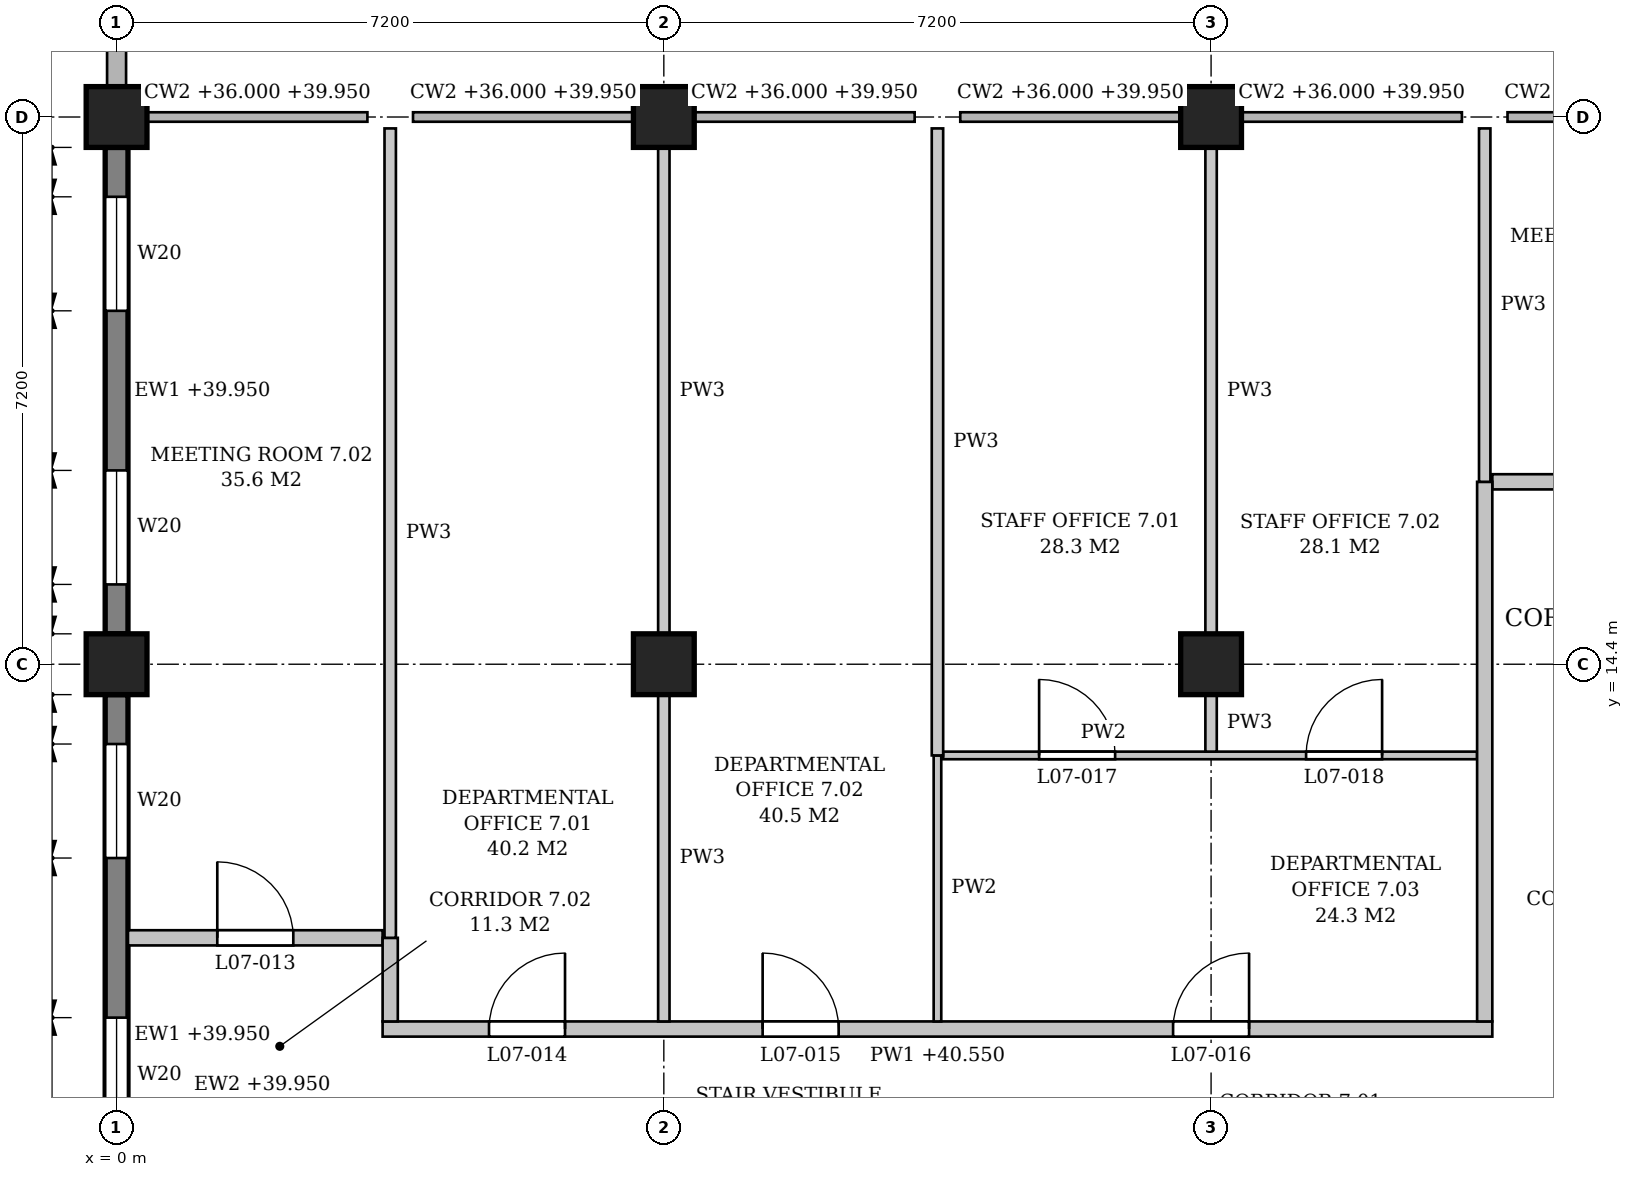
"""IFC4 building model, lengths in metres.
Left out: names, types, materials, properties, quantities, classifications, styles, units other than length and angle.
Written with IfcOpenShell. Run it as: python <this file> out.ifc"""

import sys

from ifc_helpers import new_model, si_unit, direction, frame, frame_2d, origin, origin_2d, place, context, subcontext, project, spatial, polyline, rectangle, outline, extrude, element, fill, save


model = new_model("IFC4")
c1 = context("Model", 3, precision=1e-05, world=origin(), true_north=direction((0.0, 1.0)))
c2 = subcontext(c1, "Body", "Model", "MODEL_VIEW")
j1 = project(units=[si_unit("LENGTHUNIT", "METRE"), si_unit("PLANEANGLEUNIT", "RADIAN")], contexts=[c1])
p1 = place(None, origin())
s1 = spatial("IfcSite", under=j1, at=p1, CompositionType="ELEMENT")
p2 = place(p1, origin())
s2 = spatial("IfcBuilding", under=s1, at=p2, CompositionType="ELEMENT")
p3 = place(p2, frame((0.0, 0.0, 36.0)))
s3 = spatial("IfcBuildingStorey", under=s2, at=p3, CompositionType="ELEMENT", Elevation=36.0)
for number, where, z_axis, x_axis in (
    (1, (0.0, 14.4, 0.0), (0.0, 0.0, 1.0), (1.0, 0.0, 0.0)),
    (2, (0.0, 21.6, 0.0), (0.0, 0.0, 1.0), (1.0, 0.0, 0.0)),
    (3, (7.2, 14.4, 0.0), (0.0, 0.0, 1.0), (1.0, 0.0, 0.0)),
    (4, (7.2, 21.6, 0.0), (0.0, 0.0, 1.0), (1.0, 0.0, 0.0)),
    (5, (14.4, 14.4, 0.0), (0.0, 0.0, 1.0), (1.0, 0.0, 0.0)),
    (6, (14.4, 21.6, 0.0), (0.0, 0.0, 1.0), (1.0, 0.0, 0.0)),
):
    element("IfcColumn", number, at=place(p3, frame(where, z_axis=z_axis, x_axis=x_axis)), inside=s3, PredefinedType="COLUMN", context=c2, shape_type="SweptSolid", body=[
        extrude(rectangle(XDim=0.8, YDim=0.8, at=origin_2d()), origin(), (0.0, 0.0, 1.0), 4.8),
    ])
p4 = place(p3, frame((0.0, 7.6, 0.0), z_axis=(0.0, 0.0, 1.0), x_axis=(0.0, 1.0, 0.0)))
e7 = element("IfcWall", 7, at=p4, inside=s3, PredefinedType="STANDARD", context=c2, shape_type="SweptSolid", body=[
    extrude(rectangle(XDim=6.4, YDim=0.3, at=frame_2d((3.2, 0.0))), origin(), (0.0, 0.0, 1.0), 3.95),
])
p5 = place(p4, frame((0.65, 0.0, 0.9)))
e8 = element("IfcOpeningElement", 8, at=p5, cuts=e7, PredefinedType="OPENING", context=c2, shape_type="SweptSolid", body=[
    extrude(outline(polyline([(0.0, 0.0), (1.5, 0.0), (1.5, 2.25), (0.75, 3.0), (0.0, 2.25), (0.0, 0.0)])), frame((0.0, 0.16, 0.0), z_axis=(0.0, -1.0, 0.0), x_axis=(1.0, 0.0, 0.0)), (0.0, 0.0, 1.0), 0.32),
])
p6 = place(p4, frame((4.25, 0.0, 0.9)))
e9 = element("IfcOpeningElement", 9, at=p6, cuts=e7, PredefinedType="OPENING", context=c2, shape_type="SweptSolid", body=[
    extrude(outline(polyline([(0.0, 0.0), (1.5, 0.0), (1.5, 2.25), (0.75, 3.0), (0.0, 2.25), (0.0, 0.0)])), frame((0.0, 0.16, 0.0), z_axis=(0.0, -1.0, 0.0), x_axis=(1.0, 0.0, 0.0)), (0.0, 0.0, 1.0), 0.32),
])
p7 = place(p3, frame((0.0, 14.8, 0.0), z_axis=(0.0, 0.0, 1.0), x_axis=(0.0, 1.0, 0.0)))
e10 = element("IfcWall", 10, at=p7, inside=s3, PredefinedType="STANDARD", context=c2, shape_type="SweptSolid", body=[
    extrude(rectangle(XDim=6.4, YDim=0.3, at=frame_2d((3.2, 0.0))), origin(), (0.0, 0.0, 1.0), 3.95),
])
p8 = place(p7, frame((0.65, 0.0, 0.9)))
e11 = element("IfcOpeningElement", 11, at=p8, cuts=e10, PredefinedType="OPENING", context=c2, shape_type="SweptSolid", body=[
    extrude(outline(polyline([(0.0, 0.0), (1.5, 0.0), (1.5, 2.25), (0.75, 3.0), (0.0, 2.25), (0.0, 0.0)])), frame((0.0, 0.16, 0.0), z_axis=(0.0, -1.0, 0.0), x_axis=(1.0, 0.0, 0.0)), (0.0, 0.0, 1.0), 0.32),
])
p9 = place(p7, frame((4.25, 0.0, 0.9)))
e12 = element("IfcOpeningElement", 12, at=p9, cuts=e10, PredefinedType="OPENING", context=c2, shape_type="SweptSolid", body=[
    extrude(outline(polyline([(0.0, 0.0), (1.5, 0.0), (1.5, 2.25), (0.75, 3.0), (0.0, 2.25), (0.0, 0.0)])), frame((0.0, 0.16, 0.0), z_axis=(0.0, -1.0, 0.0), x_axis=(1.0, 0.0, 0.0)), (0.0, 0.0, 1.0), 0.32),
])
p10 = place(p3, frame((0.0, 22.0, 4.8), z_axis=(0.0, 0.0, 1.0), x_axis=(0.0, 1.0, 0.0)))
e13 = element("IfcWall", 13, at=p10, inside=s3, PredefinedType="POLYGONAL", context=c2, shape_type="SweptSolid", body=[
    extrude(outline(polyline([(0.0, 0.0), (13.6, 0.0), (13.6, 0.4), (6.8, 7.2), (0.0, 0.4), (0.0, 0.0)])), frame((0.0, 0.15, 0.0), z_axis=(0.0, -1.0, 0.0), x_axis=(1.0, 0.0, 0.0)), (0.0, 0.0, 1.0), 0.3),
])
p11 = place(p10, frame((6.05, 0.0, 3.5)))
e14 = element("IfcOpeningElement", 14, at=p11, cuts=e13, PredefinedType="OPENING", context=c2, shape_type="SweptSolid", body=[
    extrude(outline(polyline([(0.0, 0.0), (1.5, 0.0), (1.5, 1.95), (0.75, 2.7), (0.0, 1.95), (0.0, 0.0)])), frame((0.0, 0.16, 0.0), z_axis=(0.0, -1.0, 0.0), x_axis=(1.0, 0.0, 0.0)), (0.0, 0.0, 1.0), 0.32),
])
p12 = place(p10, frame((2.6, 0.0, 0.8)))
e15 = element("IfcOpeningElement", 15, at=p12, cuts=e13, PredefinedType="OPENING", context=c2, shape_type="SweptSolid", body=[
    extrude(outline(polyline([(0.0, 0.0), (1.2, 0.0), (1.2, 1.65), (0.6, 2.25), (0.0, 1.65), (0.0, 0.0)])), frame((0.0, 0.16, 0.0), z_axis=(0.0, -1.0, 0.0), x_axis=(1.0, 0.0, 0.0)), (0.0, 0.0, 1.0), 0.32),
])
p13 = place(p10, frame((9.8, 0.0, 0.8)))
e16 = element("IfcOpeningElement", 16, at=p13, cuts=e13, PredefinedType="OPENING", context=c2, shape_type="SweptSolid", body=[
    extrude(outline(polyline([(0.0, 0.0), (1.2, 0.0), (1.2, 1.65), (0.6, 2.25), (0.0, 1.65), (0.0, 0.0)])), frame((0.0, 0.16, 0.0), z_axis=(0.0, -1.0, 0.0), x_axis=(1.0, 0.0, 0.0)), (0.0, 0.0, 1.0), 0.32),
])
p14 = place(p3, frame((3.5, 9.6, 0.0), z_axis=(0.0, 0.0, 1.0), x_axis=(1.0, 0.0, 0.0)))
e17 = element("IfcWall", 17, at=p14, inside=s3, PredefinedType="PARTITIONING", context=c2, shape_type="SweptSolid", body=[
    extrude(outline(polyline([(0.0, 0.0), (14.6, 0.0), (14.6, 4.55), (11.125, 4.55), (11.125, 3.85), (10.675, 3.85), (10.675, 4.55), (3.925, 4.55), (3.925, 3.85), (3.475, 3.85), (3.475, 4.55), (0.0, 4.55), (0.0, 0.0)])), frame((0.0, 0.1, 0.0), z_axis=(0.0, -1.0, 0.0), x_axis=(1.0, 0.0, 0.0)), (0.0, 0.0, 1.0), 0.2),
])
p15 = place(p14, frame((1.4, 0.0, 0.0)))
e18 = element("IfcOpeningElement", 18, at=p15, cuts=e17, PredefinedType="OPENING", context=c2, shape_type="SweptSolid", body=[
    extrude(rectangle(XDim=1.0, YDim=2.1, at=frame_2d((0.5, 1.05))), frame((0.0, 0.11, 0.0), z_axis=(0.0, -1.0, 0.0), x_axis=(1.0, 0.0, 0.0)), (0.0, 0.0, 1.0), 0.22),
])
p16 = place(p14, frame((5.0, 0.0, 0.0)))
e19 = element("IfcOpeningElement", 19, at=p16, cuts=e17, PredefinedType="OPENING", context=c2, shape_type="SweptSolid", body=[
    extrude(rectangle(XDim=1.0, YDim=2.1, at=frame_2d((0.5, 1.05))), frame((0.0, 0.11, 0.0), z_axis=(0.0, -1.0, 0.0), x_axis=(1.0, 0.0, 0.0)), (0.0, 0.0, 1.0), 0.22),
])
p17 = place(p14, frame((10.4, 0.0, 0.0)))
e20 = element("IfcOpeningElement", 20, at=p17, cuts=e17, PredefinedType="OPENING", context=c2, shape_type="SweptSolid", body=[
    extrude(rectangle(XDim=1.0, YDim=2.1, at=frame_2d((0.5, 1.05))), frame((0.0, 0.11, 0.0), z_axis=(0.0, -1.0, 0.0), x_axis=(1.0, 0.0, 0.0)), (0.0, 0.0, 1.0), 0.22),
])
p18 = place(p3, frame((0.15, 10.8, 0.0), z_axis=(0.0, 0.0, 1.0), x_axis=(1.0, 0.0, 0.0)))
e21 = element("IfcWall", 21, at=p18, inside=s3, PredefinedType="PARTITIONING", context=c2, shape_type="SweptSolid", body=[
    extrude(outline(polyline([(0.0, 0.0), (3.35, 0.0), (3.35, 4.55), (0.05, 4.55), (0.05, 3.95), (0.0, 3.95), (0.0, 0.0)])), frame((0.0, 0.1, 0.0), z_axis=(0.0, -1.0, 0.0), x_axis=(1.0, 0.0, 0.0)), (0.0, 0.0, 1.0), 0.2),
])
p19 = place(p18, frame((1.175, 0.0, 0.0)))
e22 = element("IfcOpeningElement", 22, at=p19, cuts=e21, PredefinedType="OPENING", context=c2, shape_type="SweptSolid", body=[
    extrude(rectangle(XDim=1.0, YDim=2.1, at=frame_2d((0.5, 1.05))), frame((0.0, 0.11, 0.0), z_axis=(0.0, -1.0, 0.0), x_axis=(1.0, 0.0, 0.0)), (0.0, 0.0, 1.0), 0.22),
])
p20 = place(p3, frame((10.875, 13.2, 0.0), z_axis=(0.0, 0.0, 1.0), x_axis=(1.0, 0.0, 0.0)))
e23 = element("IfcWall", 23, at=p20, inside=s3, PredefinedType="PARTITIONING", context=c2, shape_type="SweptSolid", body=[
    extrude(rectangle(XDim=7.025, YDim=0.1, at=frame_2d((3.512, 0.0))), origin(), (0.0, 0.0, 1.0), 3.85),
])
p21 = place(p20, frame((1.262, 0.0, 0.0)))
e24 = element("IfcOpeningElement", 24, at=p21, cuts=e23, PredefinedType="OPENING", context=c2, shape_type="SweptSolid", body=[
    extrude(rectangle(XDim=1.0, YDim=2.1, at=frame_2d((0.5, 1.05))), frame((0.0, 0.06, 0.0), z_axis=(0.0, -1.0, 0.0), x_axis=(1.0, 0.0, 0.0)), (0.0, 0.0, 1.0), 0.12),
])
p22 = place(p20, frame((4.775, 0.0, 0.0)))
e25 = element("IfcOpeningElement", 25, at=p22, cuts=e23, PredefinedType="OPENING", context=c2, shape_type="SweptSolid", body=[
    extrude(rectangle(XDim=1.0, YDim=2.1, at=frame_2d((0.5, 1.05))), frame((0.0, 0.06, 0.0), z_axis=(0.0, -1.0, 0.0), x_axis=(1.0, 0.0, 0.0)), (0.0, 0.0, 1.0), 0.12),
])
p23 = place(p3, frame((18.1, 16.8, 0.0), z_axis=(0.0, 0.0, 1.0), x_axis=(1.0, 0.0, 0.0)))
e26 = element("IfcWall", 26, at=p23, inside=s3, PredefinedType="PARTITIONING", context=c2, shape_type="SweptSolid", body=[
    extrude(outline(polyline([(0.0, 0.0), (3.4, 0.0), (3.4, 3.85), (3.275, 3.85), (3.275, 4.55), (0.0, 4.55), (0.0, 0.0)])), frame((0.0, 0.1, 0.0), z_axis=(0.0, -1.0, 0.0), x_axis=(1.0, 0.0, 0.0)), (0.0, 0.0, 1.0), 0.2),
])
p24 = place(p23, frame((1.2, 0.0, 0.0)))
e27 = element("IfcOpeningElement", 27, at=p24, cuts=e26, PredefinedType="OPENING", context=c2, shape_type="SweptSolid", body=[
    extrude(rectangle(XDim=1.0, YDim=2.1, at=frame_2d((0.5, 1.05))), frame((0.0, 0.11, 0.0), z_axis=(0.0, -1.0, 0.0), x_axis=(1.0, 0.0, 0.0)), (0.0, 0.0, 1.0), 0.22),
])
p25 = place(p3, frame((3.6, 9.7, 0.0), z_axis=(0.0, 0.0, 1.0), x_axis=(0.0, 1.0, 0.0)))
e28 = element("IfcWall", 28, at=p25, inside=s3, PredefinedType="PARTITIONING", context=c2, shape_type="SweptSolid", body=[
    extrude(rectangle(XDim=1.1, YDim=0.2, at=frame_2d((0.55, 0.0))), origin(), (0.0, 0.0, 1.0), 4.55),
])
p26 = place(p3, frame((3.6, 10.8, 0.0), z_axis=(0.0, 0.0, 1.0), x_axis=(0.0, 1.0, 0.0)))
e29 = element("IfcWall", 29, at=p26, inside=s3, PredefinedType="PARTITIONING", context=c2, shape_type="SweptSolid", body=[
    extrude(rectangle(XDim=10.65, YDim=0.15, at=frame_2d((5.325, 0.0))), origin(), (0.0, 0.0, 1.0), 3.85),
])
p27 = place(p3, frame((7.2, 9.7, 0.0), z_axis=(0.0, 0.0, 1.0), x_axis=(0.0, 1.0, 0.0)))
e30 = element("IfcWall", 30, at=p27, inside=s3, PredefinedType="PARTITIONING", context=c2, shape_type="SweptSolid", body=[
    extrude(rectangle(XDim=4.3, YDim=0.15, at=frame_2d((2.15, 0.0))), origin(), (0.0, 0.0, 1.0), 3.85),
])
p28 = place(p3, frame((7.2, 14.8, 0.0), z_axis=(0.0, 0.0, 1.0), x_axis=(0.0, 1.0, 0.0)))
e31 = element("IfcWall", 31, at=p28, inside=s3, PredefinedType="PARTITIONING", context=c2, shape_type="SweptSolid", body=[
    extrude(rectangle(XDim=6.4, YDim=0.15, at=frame_2d((3.2, 0.0))), origin(), (0.0, 0.0, 1.0), 3.85),
])
p29 = place(p3, frame((10.8, 9.7, 0.0), z_axis=(0.0, 0.0, 1.0), x_axis=(0.0, 1.0, 0.0)))
e32 = element("IfcWall", 32, at=p29, inside=s3, PredefinedType="PARTITIONING", context=c2, shape_type="SweptSolid", body=[
    extrude(rectangle(XDim=3.5, YDim=0.1, at=frame_2d((1.75, 0.0))), origin(), (0.0, 0.0, 1.0), 3.85),
])
p30 = place(p3, frame((10.8, 13.2, 0.0), z_axis=(0.0, 0.0, 1.0), x_axis=(0.0, 1.0, 0.0)))
e33 = element("IfcWall", 33, at=p30, inside=s3, PredefinedType="PARTITIONING", context=c2, shape_type="SweptSolid", body=[
    extrude(rectangle(XDim=8.25, YDim=0.15, at=frame_2d((4.125, 0.0))), origin(), (0.0, 0.0, 1.0), 3.85),
])
p31 = place(p3, frame((14.4, 13.25, 0.0), z_axis=(0.0, 0.0, 1.0), x_axis=(0.0, 1.0, 0.0)))
e34 = element("IfcWall", 34, at=p31, inside=s3, PredefinedType="PARTITIONING", context=c2, shape_type="SweptSolid", body=[
    extrude(rectangle(XDim=0.75, YDim=0.15, at=frame_2d((0.375, 0.0))), origin(), (0.0, 0.0, 1.0), 3.85),
])
p32 = place(p3, frame((14.4, 14.8, 0.0), z_axis=(0.0, 0.0, 1.0), x_axis=(0.0, 1.0, 0.0)))
e35 = element("IfcWall", 35, at=p32, inside=s3, PredefinedType="PARTITIONING", context=c2, shape_type="SweptSolid", body=[
    extrude(rectangle(XDim=6.4, YDim=0.15, at=frame_2d((3.2, 0.0))), origin(), (0.0, 0.0, 1.0), 3.85),
])
p33 = place(p3, frame((18.0, 9.7, 0.0), z_axis=(0.0, 0.0, 1.0), x_axis=(0.0, 1.0, 0.0)))
e36 = element("IfcWall", 36, at=p33, inside=s3, PredefinedType="PARTITIONING", context=c2, shape_type="SweptSolid", body=[
    extrude(outline(polyline([(0.0, 0.0), (7.1, 0.0), (7.1, 4.55), (4.925, 4.55), (4.925, 3.85), (4.475, 3.85), (4.475, 4.55), (0.0, 4.55), (0.0, 0.0)])), frame((0.0, 0.1, 0.0), z_axis=(0.0, -1.0, 0.0), x_axis=(1.0, 0.0, 0.0)), (0.0, 0.0, 1.0), 0.2),
])
p34 = place(p3, frame((18.0, 16.8, 0.0), z_axis=(0.0, 0.0, 1.0), x_axis=(0.0, 1.0, 0.0)))
e37 = element("IfcWall", 37, at=p34, inside=s3, PredefinedType="PARTITIONING", context=c2, shape_type="SweptSolid", body=[
    extrude(rectangle(XDim=4.65, YDim=0.15, at=frame_2d((2.325, 0.0))), origin(), (0.0, 0.0, 1.0), 3.85),
])
p35 = place(p5, origin())
e38 = element("IfcWindow", 38, at=p35, inside=s3, PartitioningType="SINGLE_PANEL", PredefinedType="WINDOW", context=c2, shape_type="SweptSolid", body=[
    extrude(outline(polyline([(0.0, 0.0), (1.5, 0.0), (1.5, 2.25), (0.75, 3.0), (0.0, 2.25), (0.0, 0.0)])), frame((0.0, 0.03, 0.0), z_axis=(0.0, -1.0, 0.0), x_axis=(1.0, 0.0, 0.0)), (0.0, 0.0, 1.0), 0.06),
])
fill(e8, e38)
p36 = place(p6, origin())
e39 = element("IfcWindow", 39, at=p36, inside=s3, PartitioningType="SINGLE_PANEL", PredefinedType="WINDOW", context=c2, shape_type="SweptSolid", body=[
    extrude(outline(polyline([(0.0, 0.0), (1.5, 0.0), (1.5, 2.25), (0.75, 3.0), (0.0, 2.25), (0.0, 0.0)])), frame((0.0, 0.03, 0.0), z_axis=(0.0, -1.0, 0.0), x_axis=(1.0, 0.0, 0.0)), (0.0, 0.0, 1.0), 0.06),
])
fill(e9, e39)
p37 = place(p8, origin())
e40 = element("IfcWindow", 40, at=p37, inside=s3, PartitioningType="SINGLE_PANEL", PredefinedType="WINDOW", context=c2, shape_type="SweptSolid", body=[
    extrude(outline(polyline([(0.0, 0.0), (1.5, 0.0), (1.5, 2.25), (0.75, 3.0), (0.0, 2.25), (0.0, 0.0)])), frame((0.0, 0.03, 0.0), z_axis=(0.0, -1.0, 0.0), x_axis=(1.0, 0.0, 0.0)), (0.0, 0.0, 1.0), 0.06),
])
fill(e11, e40)
p38 = place(p9, origin())
e41 = element("IfcWindow", 41, at=p38, inside=s3, PartitioningType="SINGLE_PANEL", PredefinedType="WINDOW", context=c2, shape_type="SweptSolid", body=[
    extrude(outline(polyline([(0.0, 0.0), (1.5, 0.0), (1.5, 2.25), (0.75, 3.0), (0.0, 2.25), (0.0, 0.0)])), frame((0.0, 0.03, 0.0), z_axis=(0.0, -1.0, 0.0), x_axis=(1.0, 0.0, 0.0)), (0.0, 0.0, 1.0), 0.06),
])
fill(e12, e41)
p39 = place(p19, origin())
e42 = element("IfcDoor", 42, at=p39, inside=s3, OperationType="SINGLE_SWING_LEFT", PredefinedType="DOOR", context=c2, shape_type="SweptSolid", body=[
    extrude(rectangle(XDim=1.0, YDim=2.1, at=frame_2d((0.5, 1.05))), frame((0.0, 0.025, 0.0), z_axis=(0.0, -1.0, 0.0), x_axis=(1.0, 0.0, 0.0)), (0.0, 0.0, 1.0), 0.05),
])
fill(e22, e42)
p40 = place(p15, origin())
e43 = element("IfcDoor", 43, at=p40, inside=s3, OperationType="SINGLE_SWING_RIGHT", PredefinedType="DOOR", context=c2, shape_type="SweptSolid", body=[
    extrude(rectangle(XDim=1.0, YDim=2.1, at=frame_2d((0.5, 1.05))), frame((0.0, 0.025, 0.0), z_axis=(0.0, -1.0, 0.0), x_axis=(1.0, 0.0, 0.0)), (0.0, 0.0, 1.0), 0.05),
])
fill(e18, e43)
p41 = place(p16, origin())
e44 = element("IfcDoor", 44, at=p41, inside=s3, OperationType="SINGLE_SWING_LEFT", PredefinedType="DOOR", context=c2, shape_type="SweptSolid", body=[
    extrude(rectangle(XDim=1.0, YDim=2.1, at=frame_2d((0.5, 1.05))), frame((0.0, 0.025, 0.0), z_axis=(0.0, -1.0, 0.0), x_axis=(1.0, 0.0, 0.0)), (0.0, 0.0, 1.0), 0.05),
])
fill(e19, e44)
p42 = place(p17, origin())
e45 = element("IfcDoor", 45, at=p42, inside=s3, OperationType="SINGLE_SWING_RIGHT", PredefinedType="DOOR", context=c2, shape_type="SweptSolid", body=[
    extrude(rectangle(XDim=1.0, YDim=2.1, at=frame_2d((0.5, 1.05))), frame((0.0, 0.025, 0.0), z_axis=(0.0, -1.0, 0.0), x_axis=(1.0, 0.0, 0.0)), (0.0, 0.0, 1.0), 0.05),
])
fill(e20, e45)
p43 = place(p21, origin())
e46 = element("IfcDoor", 46, at=p43, inside=s3, OperationType="SINGLE_SWING_LEFT", PredefinedType="DOOR", context=c2, shape_type="SweptSolid", body=[
    extrude(rectangle(XDim=1.0, YDim=2.1, at=frame_2d((0.5, 1.05))), frame((0.0, 0.025, 0.0), z_axis=(0.0, -1.0, 0.0), x_axis=(1.0, 0.0, 0.0)), (0.0, 0.0, 1.0), 0.05),
])
fill(e24, e46)
p44 = place(p22, origin())
e47 = element("IfcDoor", 47, at=p44, inside=s3, OperationType="SINGLE_SWING_RIGHT", PredefinedType="DOOR", context=c2, shape_type="SweptSolid", body=[
    extrude(rectangle(XDim=1.0, YDim=2.1, at=frame_2d((0.5, 1.05))), frame((0.0, 0.025, 0.0), z_axis=(0.0, -1.0, 0.0), x_axis=(1.0, 0.0, 0.0)), (0.0, 0.0, 1.0), 0.05),
])
fill(e25, e47)
save(model, sys.argv[1])
